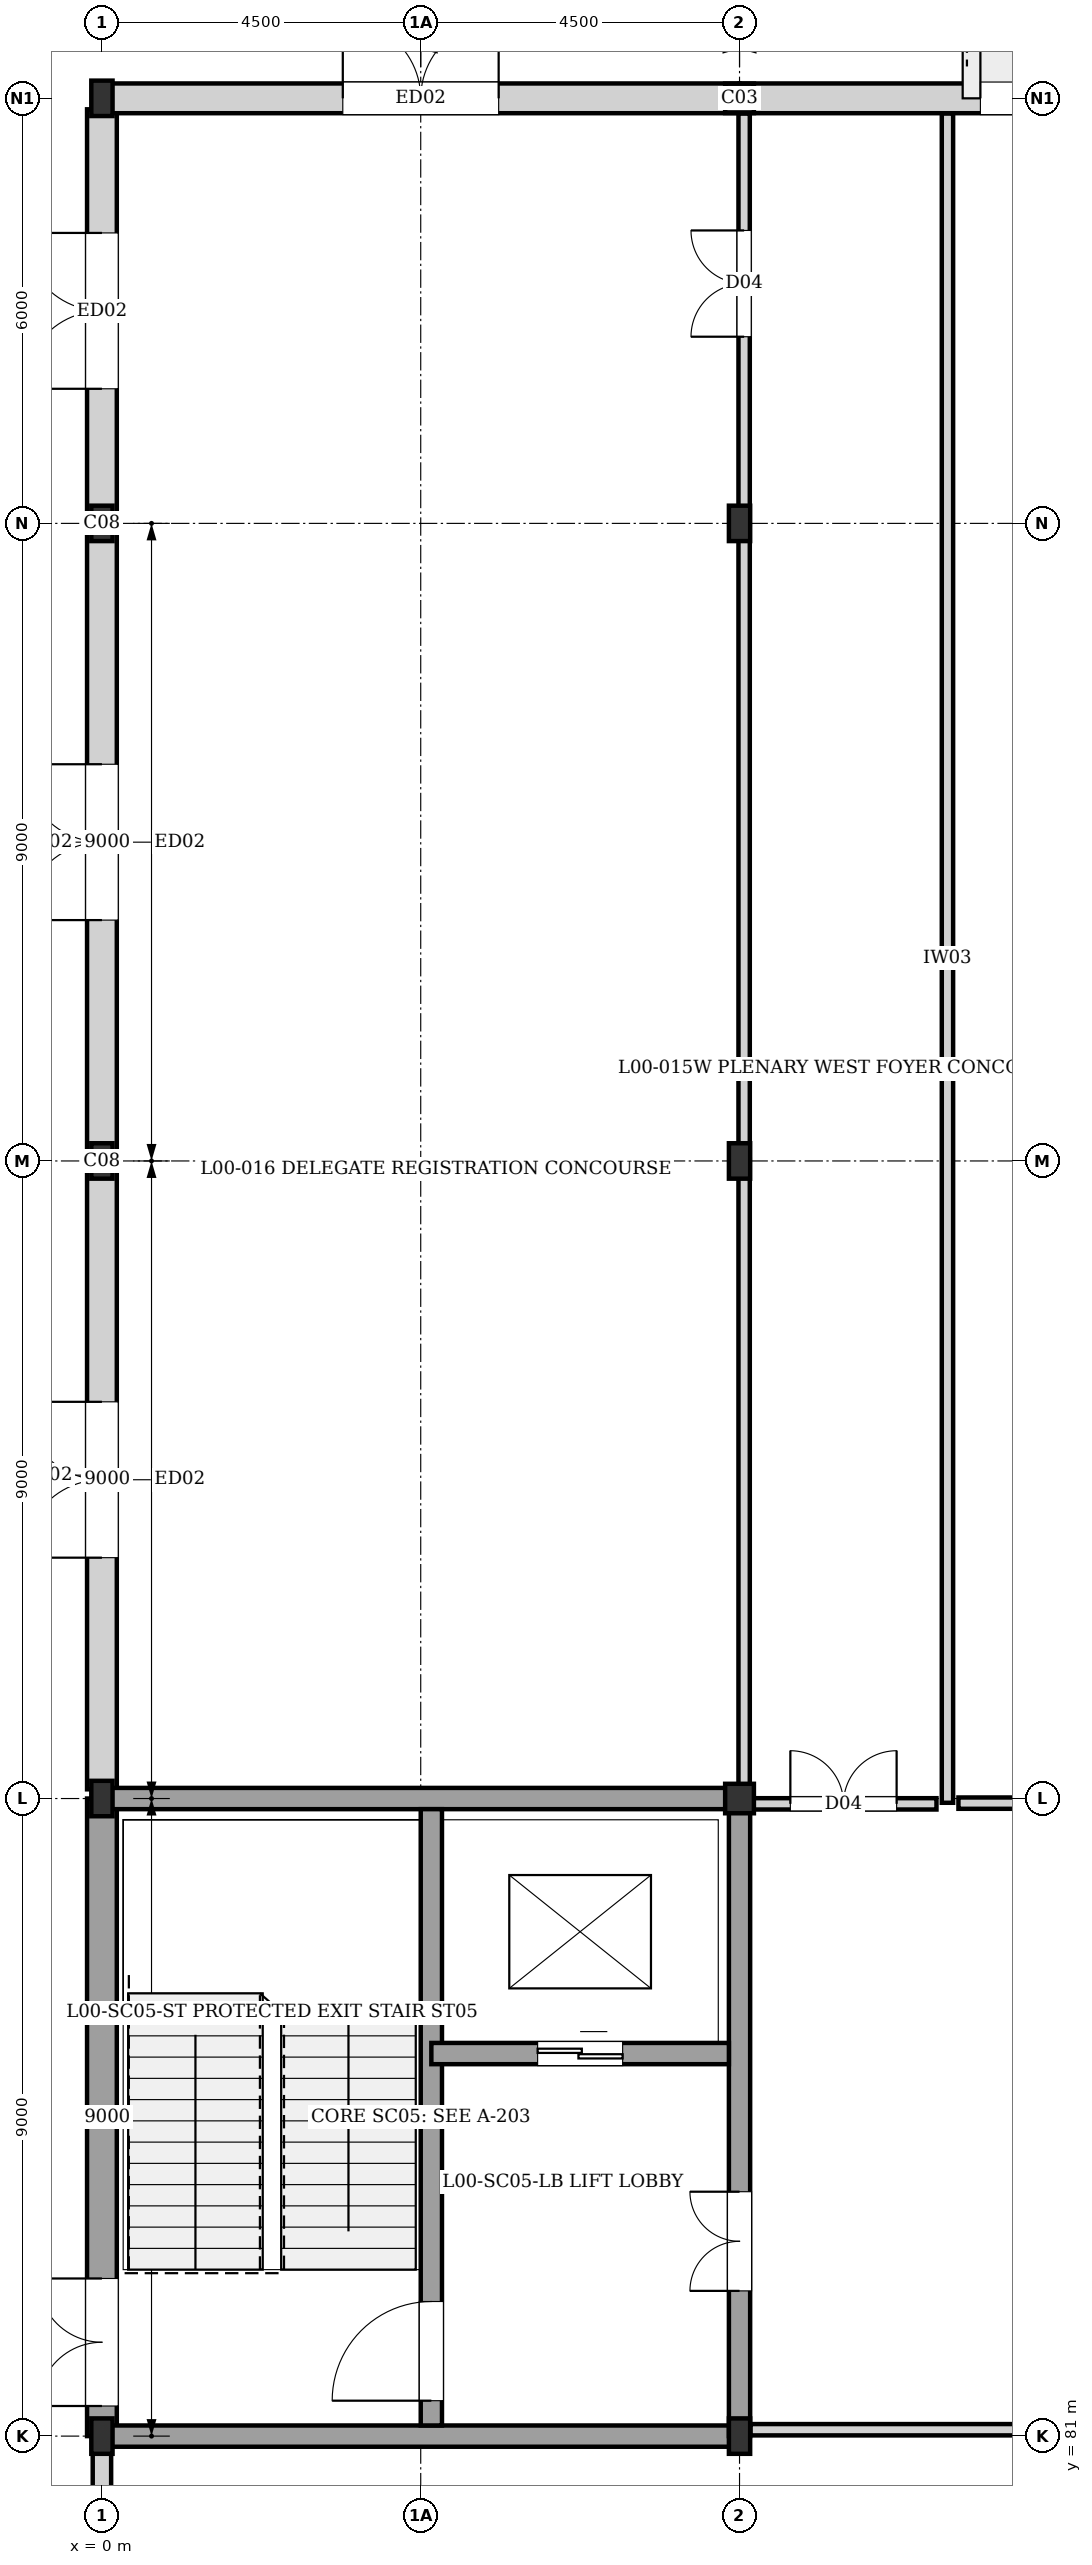
"""IFC4 building model, lengths in metres.
Left out: names, types, materials, properties, quantities, classifications, styles, units other than length and angle.
Written with IfcOpenShell. Run it as: python <this file> out.ifc"""

import sys

from ifc_helpers import new_model, si_unit, direction, frame, frame_2d, origin, origin_2d, place, context, subcontext, project, spatial, rectangle, i_section, extrude, element, fill, save


model = new_model("IFC4")
c1 = context("Model", 3, precision=1e-05, world=origin(), true_north=direction((0.0, 1.0)))
c2 = subcontext(c1, "Body", "Model", "MODEL_VIEW")
j1 = project(units=[si_unit("LENGTHUNIT", "METRE"), si_unit("PLANEANGLEUNIT", "RADIAN")], contexts=[c1])
p1 = place(None, origin())
s1 = spatial("IfcSite", under=j1, at=p1, CompositionType="ELEMENT")
p2 = place(p1, origin())
s2 = spatial("IfcBuilding", under=s1, at=p2, CompositionType="ELEMENT")
p3 = place(p2, origin())
s3 = spatial("IfcBuildingStorey", under=s2, at=p3, CompositionType="ELEMENT", Elevation=0.0)
for number, where, z_axis, x_axis in (
    (1, (0.0, 81.0, 0.0), (0.0, 0.0, 1.0), (1.0, 0.0, 0.0)),
    (2, (0.0, 90.0, 0.0), (0.0, 0.0, 1.0), (1.0, 0.0, 0.0)),
    (3, (0.0, 99.0, 0.0), (0.0, 0.0, 1.0), (1.0, 0.0, 0.0)),
    (4, (0.0, 108.0, 0.0), (0.0, 0.0, 1.0), (1.0, 0.0, 0.0)),
    (5, (0.0, 114.0, 0.0), (0.0, 0.0, 1.0), (1.0, 0.0, 0.0)),
    (6, (9.0, 81.0, 0.0), (0.0, 0.0, 1.0), (1.0, 0.0, 0.0)),
):
    element("IfcColumn", number, at=place(p3, frame(where, z_axis=z_axis, x_axis=x_axis)), inside=s3, PredefinedType="COLUMN", context=c2, shape_type="SweptSolid", body=[
        extrude(i_section(OverallWidth=0.3, OverallDepth=0.5, WebThickness=0.014, FlangeThickness=0.028, at=origin_2d()), origin(), (0.0, 0.0, 1.0), 4.32),
    ])
p4 = place(p3, frame((9.0, 90.0, 0.0), z_axis=(0.0, 0.0, 1.0), x_axis=(1.0, 0.0, 0.0)))
e7 = element("IfcColumn", 7, at=p4, inside=s3, PredefinedType="COLUMN", context=c2, shape_type="SweptSolid", body=[
    extrude(i_section(OverallWidth=0.406, OverallDepth=0.416, WebThickness=0.022, FlangeThickness=0.038, at=origin_2d()), origin(), (0.0, 0.0, 1.0), 4.32),
])
for number, where, z_axis, x_axis in (
    (8, (9.0, 99.0, 0.0), (0.0, 0.0, 1.0), (1.0, 0.0, 0.0)),
    (9, (9.0, 108.0, 0.0), (0.0, 0.0, 1.0), (1.0, 0.0, 0.0)),
):
    element("IfcColumn", number, at=place(p3, frame(where, z_axis=z_axis, x_axis=x_axis)), inside=s3, PredefinedType="COLUMN", context=c2, shape_type="SweptSolid", body=[
        extrude(i_section(OverallWidth=0.3, OverallDepth=0.5, WebThickness=0.014, FlangeThickness=0.028, at=origin_2d()), origin(), (0.0, 0.0, 1.0), 4.32),
    ])
p5 = place(p3, frame((9.0, 114.0, 0.0), z_axis=(0.0, 0.0, 1.0), x_axis=(1.0, 0.0, 0.0)))
e10 = element("IfcColumn", 10, at=p5, inside=s3, PredefinedType="COLUMN", context=c2, shape_type="SweptSolid", body=[
    extrude(i_section(OverallWidth=0.406, OverallDepth=0.416, WebThickness=0.022, FlangeThickness=0.038, at=origin_2d()), origin(), (0.0, 0.0, 1.0), 4.32),
])
p6 = place(p3, frame((0.0, 72.0, 0.0), z_axis=(0.0, 0.0, 1.0), x_axis=(0.0, 1.0, 0.0)))
e11 = element("IfcWall", 11, at=p6, inside=s3, PredefinedType="SOLIDWALL", context=c2, shape_type="SweptSolid", body=[
    extrude(rectangle(XDim=8.87, YDim=0.26, at=frame_2d((4.435, 0.0))), origin(), (0.0, 0.0, 1.0), 3.655),
])
p7 = place(p6, frame((3.4, 0.0, 0.0)))
e12 = element("IfcOpeningElement", 12, at=p7, cuts=e11, PredefinedType="OPENING", context=c2, shape_type="SweptSolid", body=[
    extrude(rectangle(XDim=2.2, YDim=2.5, at=frame_2d((1.1, 1.25))), frame((0.0, 0.14, 0.0), z_axis=(0.0, -1.0, 0.0), x_axis=(1.0, 0.0, 0.0)), (0.0, 0.0, 1.0), 0.28),
])
p8 = place(p3, frame((0.0, 81.0, 0.0), z_axis=(0.0, 0.0, 1.0), x_axis=(0.0, 1.0, 0.0)))
e13 = element("IfcWall", 13, at=p8, inside=s3, PredefinedType="SOLIDWALL", context=c2, shape_type="SweptSolid", body=[
    extrude(rectangle(XDim=9.0, YDim=0.42, at=frame_2d((4.5, 0.0))), origin(), (0.0, 0.0, 1.0), 4.055),
])
p9 = place(p8, frame((0.425, 0.0, 0.0)))
e14 = element("IfcOpeningElement", 14, at=p9, cuts=e13, PredefinedType="OPENING", context=c2, shape_type="SweptSolid", body=[
    extrude(rectangle(XDim=1.8, YDim=2.2, at=frame_2d((0.9, 1.1))), frame((0.0, 0.22, 0.0), z_axis=(0.0, -1.0, 0.0), x_axis=(1.0, 0.0, 0.0)), (0.0, 0.0, 1.0), 0.44),
])
p10 = place(p3, frame((0.0, 90.13, 0.0), z_axis=(0.0, 0.0, 1.0), x_axis=(0.0, 1.0, 0.0)))
e15 = element("IfcWall", 15, at=p10, inside=s3, PredefinedType="SOLIDWALL", context=c2, shape_type="SweptSolid", body=[
    extrude(rectangle(XDim=8.87, YDim=0.42, at=frame_2d((4.435, 0.0))), origin(), (0.0, 0.0, 1.0), 3.755),
])
p11 = place(p10, frame((3.27, 0.0, 0.0)))
e16 = element("IfcOpeningElement", 16, at=p11, cuts=e15, PredefinedType="OPENING", context=c2, shape_type="SweptSolid", body=[
    extrude(rectangle(XDim=2.2, YDim=2.5, at=frame_2d((1.1, 1.25))), frame((0.0, 0.22, 0.0), z_axis=(0.0, -1.0, 0.0), x_axis=(1.0, 0.0, 0.0)), (0.0, 0.0, 1.0), 0.44),
])
p12 = place(p3, frame((0.0, 99.0, 0.0), z_axis=(0.0, 0.0, 1.0), x_axis=(0.0, 1.0, 0.0)))
e17 = element("IfcWall", 17, at=p12, inside=s3, PredefinedType="SOLIDWALL", context=c2, shape_type="SweptSolid", body=[
    extrude(rectangle(XDim=9.0, YDim=0.42, at=frame_2d((4.5, 0.0))), origin(), (0.0, 0.0, 1.0), 3.695),
])
p13 = place(p12, frame((3.4, 0.0, 0.0)))
e18 = element("IfcOpeningElement", 18, at=p13, cuts=e17, PredefinedType="OPENING", context=c2, shape_type="SweptSolid", body=[
    extrude(rectangle(XDim=2.2, YDim=2.5, at=frame_2d((1.1, 1.25))), frame((0.0, 0.22, 0.0), z_axis=(0.0, -1.0, 0.0), x_axis=(1.0, 0.0, 0.0)), (0.0, 0.0, 1.0), 0.44),
])
p14 = place(p3, frame((0.0, 108.0, 0.0), z_axis=(0.0, 0.0, 1.0), x_axis=(0.0, 1.0, 0.0)))
e19 = element("IfcWall", 19, at=p14, inside=s3, PredefinedType="SOLIDWALL", context=c2, shape_type="SweptSolid", body=[
    extrude(rectangle(XDim=5.845, YDim=0.42, at=frame_2d((2.922, 0.0))), origin(), (0.0, 0.0, 1.0), 3.655),
])
p15 = place(p14, frame((1.9, 0.0, 0.0)))
e20 = element("IfcOpeningElement", 20, at=p15, cuts=e19, PredefinedType="OPENING", context=c2, shape_type="SweptSolid", body=[
    extrude(rectangle(XDim=2.2, YDim=2.5, at=frame_2d((1.1, 1.25))), frame((0.0, 0.22, 0.0), z_axis=(0.0, -1.0, 0.0), x_axis=(1.0, 0.0, 0.0)), (0.0, 0.0, 1.0), 0.44),
])
p16 = place(p3, frame((0.0, 114.0, 0.0), z_axis=(0.0, 0.0, 1.0), x_axis=(1.0, 0.0, 0.0)))
e21 = element("IfcWall", 21, at=p16, inside=s3, PredefinedType="SOLIDWALL", context=c2, shape_type="SweptSolid", body=[
    extrude(rectangle(XDim=9.0, YDim=0.42, at=frame_2d((4.5, 0.0))), origin(), (0.0, 0.0, 1.0), 3.695),
])
p17 = place(p16, frame((3.4, 0.0, 0.0)))
e22 = element("IfcOpeningElement", 22, at=p17, cuts=e21, PredefinedType="OPENING", context=c2, shape_type="SweptSolid", body=[
    extrude(rectangle(XDim=2.2, YDim=2.5, at=frame_2d((1.1, 1.25))), frame((0.0, 0.22, 0.0), z_axis=(0.0, -1.0, 0.0), x_axis=(1.0, 0.0, 0.0)), (0.0, 0.0, 1.0), 0.44),
])
p18 = place(p3, frame((9.0, 114.0, 0.0), z_axis=(0.0, 0.0, 1.0), x_axis=(1.0, 0.0, 0.0)))
e23 = element("IfcWall", 23, at=p18, inside=s3, PredefinedType="SOLIDWALL", context=c2, shape_type="SweptSolid", body=[
    extrude(rectangle(XDim=9.0, YDim=0.42, at=frame_2d((4.5, 0.0))), origin(), (0.0, 0.0, 1.0), 3.655),
])
p19 = place(p18, frame((3.4, 0.0, 0.0)))
e24 = element("IfcOpeningElement", 24, at=p19, cuts=e23, PredefinedType="OPENING", context=c2, shape_type="SweptSolid", body=[
    extrude(rectangle(XDim=2.2, YDim=2.5, at=frame_2d((1.1, 1.25))), frame((0.0, 0.22, 0.0), z_axis=(0.0, -1.0, 0.0), x_axis=(1.0, 0.0, 0.0)), (0.0, 0.0, 1.0), 0.44),
])
p20 = place(p3, frame((0.0, 81.0, 0.0), z_axis=(0.0, 0.0, 1.0), x_axis=(1.0, 0.0, 0.0)))
e25 = element("IfcWall", 25, at=p20, inside=s3, PredefinedType="SHEAR", context=c2, shape_type="SweptSolid", body=[
    extrude(rectangle(XDim=9.0, YDim=0.3, at=frame_2d((4.5, 0.0))), origin(), (0.0, 0.0, 1.0), 4.055),
])
p21 = place(p3, frame((9.0, 81.0, 0.0), z_axis=(0.0, 0.0, 1.0), x_axis=(0.0, 1.0, 0.0)))
e26 = element("IfcWall", 26, at=p21, inside=s3, PredefinedType="SHEAR", context=c2, shape_type="SweptSolid", body=[
    extrude(rectangle(XDim=9.0, YDim=0.3, at=frame_2d((4.5, 0.0))), origin(), (0.0, 0.0, 1.0), 4.055),
])
p22 = place(p21, frame((2.05, 0.0, 0.0)))
e27 = element("IfcOpeningElement", 27, at=p22, cuts=e26, PredefinedType="OPENING", context=c2, shape_type="SweptSolid", body=[
    extrude(rectangle(XDim=1.4, YDim=2.02, at=frame_2d((0.7, 1.01))), frame((0.0, 0.16, 0.0), z_axis=(0.0, -1.0, 0.0), x_axis=(1.0, 0.0, 0.0)), (0.0, 0.0, 1.0), 0.32),
])
p23 = place(p3, frame((0.0, 90.0, 0.0), z_axis=(0.0, 0.0, 1.0), x_axis=(1.0, 0.0, 0.0)))
e28 = element("IfcWall", 28, at=p23, inside=s3, PredefinedType="SHEAR", context=c2, shape_type="SweptSolid", body=[
    extrude(rectangle(XDim=9.0, YDim=0.3, at=frame_2d((4.5, 0.0))), origin(), (0.0, 0.0, 1.0), 4.055),
])
p24 = place(p3, frame((4.65, 81.15, 0.0), z_axis=(0.0, 0.0, 1.0), x_axis=(0.0, 1.0, 0.0)))
e29 = element("IfcWall", 29, at=p24, inside=s3, PredefinedType="SHEAR", context=c2, shape_type="SweptSolid", body=[
    extrude(rectangle(XDim=8.7, YDim=0.3, at=frame_2d((4.35, 0.0))), origin(), (0.0, 0.0, 1.0), 4.055),
])
p25 = place(p24, frame((0.35, 0.0, 0.0)))
e30 = element("IfcOpeningElement", 30, at=p25, cuts=e29, PredefinedType="OPENING", context=c2, shape_type="SweptSolid", body=[
    extrude(rectangle(XDim=1.4, YDim=2.02, at=frame_2d((0.7, 1.01))), frame((0.0, 0.16, 0.0), z_axis=(0.0, -1.0, 0.0), x_axis=(1.0, 0.0, 0.0)), (0.0, 0.0, 1.0), 0.32),
])
p26 = place(p3, frame((4.65, 86.4, 0.0), z_axis=(0.0, 0.0, 1.0), x_axis=(1.0, 0.0, 0.0)))
e31 = element("IfcWall", 31, at=p26, inside=s3, PredefinedType="SHEAR", context=c2, shape_type="SweptSolid", body=[
    extrude(rectangle(XDim=4.2, YDim=0.3, at=frame_2d((2.1, 0.0))), origin(), (0.0, 0.0, 1.0), 4.055),
])
p27 = place(p26, frame((1.5, 0.0, 0.0)))
e32 = element("IfcOpeningElement", 32, at=p27, cuts=e31, PredefinedType="OPENING", context=c2, shape_type="SweptSolid", body=[
    extrude(rectangle(XDim=1.2, YDim=2.2, at=frame_2d((0.6, 1.1))), frame((0.0, 0.16, 0.0), z_axis=(0.0, -1.0, 0.0), x_axis=(1.0, 0.0, 0.0)), (0.0, 0.0, 1.0), 0.32),
])
p28 = place(p3, frame((11.935, 89.94, 0.0), z_axis=(0.0, 0.0, 1.0), x_axis=(0.0, 1.0, 0.0)))
e33 = element("IfcWall", 33, at=p28, inside=s3, PredefinedType="PARTITIONING", context=c2, shape_type="SweptSolid", body=[
    extrude(rectangle(XDim=23.845, YDim=0.16, at=frame_2d((11.922, 0.0))), origin(), (0.0, 0.0, 1.0), 4.055),
])
p29 = place(p3, frame((9.155, 89.925, 0.0), z_axis=(0.0, 0.0, 1.0), x_axis=(1.0, 0.0, 0.0)))
e34 = element("IfcWall", 34, at=p29, inside=s3, PredefinedType="PARTITIONING", context=c2, shape_type="SweptSolid", body=[
    extrude(rectangle(XDim=2.625, YDim=0.16, at=frame_2d((1.312, 0.0))), origin(), (0.0, 0.0, 1.0), 3.655),
])
p30 = place(p29, frame((0.562, 0.0, 0.0)))
e35 = element("IfcOpeningElement", 35, at=p30, cuts=e34, PredefinedType="OPENING", context=c2, shape_type="SweptSolid", body=[
    extrude(rectangle(XDim=1.5, YDim=2.1, at=frame_2d((0.75, 1.05))), frame((0.0, 0.09, 0.0), z_axis=(0.0, -1.0, 0.0), x_axis=(1.0, 0.0, 0.0)), (0.0, 0.0, 1.0), 0.18),
])
p31 = place(p3, frame((12.09, 89.935, 0.0), z_axis=(0.0, 0.0, 1.0), x_axis=(1.0, 0.0, 0.0)))
e36 = element("IfcWall", 36, at=p31, inside=s3, PredefinedType="PARTITIONING", context=c2, shape_type="SweptSolid", body=[
    extrude(rectangle(XDim=5.89, YDim=0.16, at=frame_2d((2.945, 0.0))), origin(), (0.0, 0.0, 1.0), 3.655),
])
p32 = place(p31, frame((1.4, 0.0, 0.0)))
e37 = element("IfcOpeningElement", 37, at=p32, cuts=e36, PredefinedType="OPENING", context=c2, shape_type="SweptSolid", body=[
    extrude(rectangle(XDim=2.0, YDim=2.35, at=frame_2d((1.0, 1.175))), frame((0.0, 0.09, 0.0), z_axis=(0.0, -1.0, 0.0), x_axis=(1.0, 0.0, 0.0)), (0.0, 0.0, 1.0), 0.18),
])
p33 = place(p3, frame((9.155, 81.09, 0.0), z_axis=(0.0, 0.0, 1.0), x_axis=(1.0, 0.0, 0.0)))
e38 = element("IfcWall", 38, at=p33, inside=s3, PredefinedType="PARTITIONING", context=c2, shape_type="SweptSolid", body=[
    extrude(rectangle(XDim=8.865, YDim=0.16, at=frame_2d((4.433, 0.0))), origin(), (0.0, 0.0, 1.0), 3.655),
])
p34 = place(p3, frame((9.065, 90.08, 0.0), z_axis=(0.0, 0.0, 1.0), x_axis=(0.0, 1.0, 0.0)))
e39 = element("IfcWall", 39, at=p34, inside=s3, PredefinedType="PARTITIONING", context=c2, shape_type="SweptSolid", body=[
    extrude(rectangle(XDim=8.94, YDim=0.16, at=frame_2d((4.47, 0.0))), origin(), (0.0, 0.0, 1.0), 3.365),
])
p35 = place(p3, frame((9.065, 99.02, 0.0), z_axis=(0.0, 0.0, 1.0), x_axis=(0.0, 1.0, 0.0)))
e40 = element("IfcWall", 40, at=p35, inside=s3, PredefinedType="PARTITIONING", context=c2, shape_type="SweptSolid", body=[
    extrude(rectangle(XDim=8.96, YDim=0.16, at=frame_2d((4.48, 0.0))), origin(), (0.0, 0.0, 1.0), 3.765),
])
p36 = place(p3, frame((9.065, 107.98, 0.0), z_axis=(0.0, 0.0, 1.0), x_axis=(0.0, 1.0, 0.0)))
e41 = element("IfcWall", 41, at=p36, inside=s3, PredefinedType="PARTITIONING", context=c2, shape_type="SweptSolid", body=[
    extrude(rectangle(XDim=5.805, YDim=0.16, at=frame_2d((2.902, 0.0))), origin(), (0.0, 0.0, 1.0), 3.725),
])
p37 = place(p36, frame((2.655, 0.0, 0.0)))
e42 = element("IfcOpeningElement", 42, at=p37, cuts=e41, PredefinedType="OPENING", context=c2, shape_type="SweptSolid", body=[
    extrude(rectangle(XDim=1.5, YDim=2.1, at=frame_2d((0.75, 1.05))), frame((0.0, 0.09, 0.0), z_axis=(0.0, -1.0, 0.0), x_axis=(1.0, 0.0, 0.0)), (0.0, 0.0, 1.0), 0.18),
])
p38 = place(p9, origin())
e43 = element("IfcDoor", 43, at=p38, inside=s3, OperationType="DOUBLE_DOOR_SINGLE_SWING", PredefinedType="DOOR", context=c2, shape_type="SweptSolid", body=[
    extrude(rectangle(XDim=1.8, YDim=2.2, at=frame_2d((0.9, 1.1))), frame((0.0, 0.025, 0.0), z_axis=(0.0, -1.0, 0.0), x_axis=(1.0, 0.0, 0.0)), (0.0, 0.0, 1.0), 0.05),
])
fill(e14, e43)
p39 = place(p11, origin())
e44 = element("IfcDoor", 44, at=p39, inside=s3, OperationType="DOUBLE_DOOR_SINGLE_SWING", PredefinedType="DOOR", context=c2, shape_type="SweptSolid", body=[
    extrude(rectangle(XDim=2.2, YDim=2.5, at=frame_2d((1.1, 1.25))), frame((0.0, 0.025, 0.0), z_axis=(0.0, -1.0, 0.0), x_axis=(1.0, 0.0, 0.0)), (0.0, 0.0, 1.0), 0.05),
])
fill(e16, e44)
p40 = place(p13, origin())
e45 = element("IfcDoor", 45, at=p40, inside=s3, OperationType="DOUBLE_DOOR_SINGLE_SWING", PredefinedType="DOOR", context=c2, shape_type="SweptSolid", body=[
    extrude(rectangle(XDim=2.2, YDim=2.5, at=frame_2d((1.1, 1.25))), frame((0.0, 0.025, 0.0), z_axis=(0.0, -1.0, 0.0), x_axis=(1.0, 0.0, 0.0)), (0.0, 0.0, 1.0), 0.05),
])
fill(e18, e45)
p41 = place(p15, origin())
e46 = element("IfcDoor", 46, at=p41, inside=s3, OperationType="DOUBLE_DOOR_SINGLE_SWING", PredefinedType="DOOR", context=c2, shape_type="SweptSolid", body=[
    extrude(rectangle(XDim=2.2, YDim=2.5, at=frame_2d((1.1, 1.25))), frame((0.0, 0.025, 0.0), z_axis=(0.0, -1.0, 0.0), x_axis=(1.0, 0.0, 0.0)), (0.0, 0.0, 1.0), 0.05),
])
fill(e20, e46)
p42 = place(p17, origin())
e47 = element("IfcDoor", 47, at=p42, inside=s3, OperationType="DOUBLE_DOOR_SINGLE_SWING", PredefinedType="DOOR", context=c2, shape_type="SweptSolid", body=[
    extrude(rectangle(XDim=2.2, YDim=2.5, at=frame_2d((1.1, 1.25))), frame((0.0, 0.025, 0.0), z_axis=(0.0, -1.0, 0.0), x_axis=(1.0, 0.0, 0.0)), (0.0, 0.0, 1.0), 0.05),
])
fill(e22, e47)
p43 = place(p19, origin())
e48 = element("IfcDoor", 48, at=p43, inside=s3, OperationType="DOUBLE_DOOR_SINGLE_SWING", PredefinedType="DOOR", context=c2, shape_type="SweptSolid", body=[
    extrude(rectangle(XDim=2.2, YDim=2.5, at=frame_2d((1.1, 1.25))), frame((0.0, 0.025, 0.0), z_axis=(0.0, -1.0, 0.0), x_axis=(1.0, 0.0, 0.0)), (0.0, 0.0, 1.0), 0.05),
])
fill(e24, e48)
p44 = place(p22, origin())
e49 = element("IfcDoor", 49, at=p44, inside=s3, OperationType="DOUBLE_DOOR_SINGLE_SWING", PredefinedType="DOOR", context=c2, shape_type="SweptSolid", body=[
    extrude(rectangle(XDim=1.4, YDim=2.02, at=frame_2d((0.7, 1.01))), frame((0.0, 0.025, 0.0), z_axis=(0.0, -1.0, 0.0), x_axis=(1.0, 0.0, 0.0)), (0.0, 0.0, 1.0), 0.05),
])
fill(e27, e49)
p45 = place(p25, origin())
e50 = element("IfcDoor", 50, at=p45, inside=s3, OperationType="SINGLE_SWING_LEFT", PredefinedType="DOOR", context=c2, shape_type="SweptSolid", body=[
    extrude(rectangle(XDim=1.4, YDim=2.02, at=frame_2d((0.7, 1.01))), frame((0.0, 0.025, 0.0), z_axis=(0.0, -1.0, 0.0), x_axis=(1.0, 0.0, 0.0)), (0.0, 0.0, 1.0), 0.05),
])
fill(e30, e50)
p46 = place(p27, origin())
e51 = element("IfcDoor", 51, at=p46, inside=s3, OperationType="DOUBLE_DOOR_SLIDING", PredefinedType="DOOR", context=c2, shape_type="SweptSolid", body=[
    extrude(rectangle(XDim=1.2, YDim=2.2, at=frame_2d((0.6, 1.1))), frame((0.0, 0.025, 0.0), z_axis=(0.0, -1.0, 0.0), x_axis=(1.0, 0.0, 0.0)), (0.0, 0.0, 1.0), 0.05),
])
fill(e32, e51)
p47 = place(p30, origin())
e52 = element("IfcDoor", 52, at=p47, inside=s3, OperationType="DOUBLE_DOOR_SINGLE_SWING", PredefinedType="DOOR", context=c2, shape_type="SweptSolid", body=[
    extrude(rectangle(XDim=1.5, YDim=2.1, at=frame_2d((0.75, 1.05))), frame((0.0, 0.025, 0.0), z_axis=(0.0, -1.0, 0.0), x_axis=(1.0, 0.0, 0.0)), (0.0, 0.0, 1.0), 0.05),
])
fill(e35, e52)
p48 = place(p37, origin())
e53 = element("IfcDoor", 53, at=p48, inside=s3, OperationType="DOUBLE_DOOR_SINGLE_SWING", PredefinedType="DOOR", context=c2, shape_type="SweptSolid", body=[
    extrude(rectangle(XDim=1.5, YDim=2.1, at=frame_2d((0.75, 1.05))), frame((0.0, 0.025, 0.0), z_axis=(0.0, -1.0, 0.0), x_axis=(1.0, 0.0, 0.0)), (0.0, 0.0, 1.0), 0.05),
])
fill(e42, e53)
save(model, sys.argv[1])
